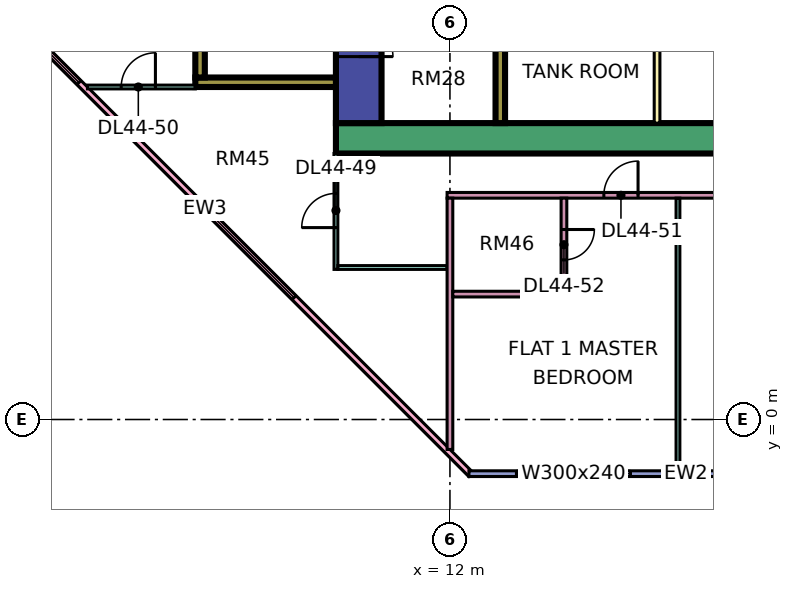
"""IFC4 building model, lengths in metres.
Left out: names, types, materials, properties, quantities, classifications, styles, units other than length and angle.
Written with IfcOpenShell. Run it as: python <this file> out.ifc"""

import sys

from ifc_helpers import new_model, si_unit, direction, frame, frame_2d, origin, place, context, subcontext, project, spatial, rectangle, extrude, element, fill, save


model = new_model("IFC4")
c1 = context("Model", 3, precision=1e-05, world=origin(), true_north=direction((0.0, 1.0)))
c2 = subcontext(c1, "Body", "Model", "MODEL_VIEW")
j1 = project(units=[si_unit("LENGTHUNIT", "METRE"), si_unit("PLANEANGLEUNIT", "RADIAN")], contexts=[c1])
p1 = place(None, origin())
s1 = spatial("IfcSite", under=j1, at=p1, CompositionType="ELEMENT")
p2 = place(p1, origin())
s2 = spatial("IfcBuilding", under=s1, at=p2, CompositionType="ELEMENT")
p3 = place(p2, frame((0.0, 0.0, 191.15)))
s3 = spatial("IfcBuildingStorey", under=s2, at=p3, CompositionType="ELEMENT", Elevation=191.15)
p4 = place(p3, frame((9.0, 7.4, 0.0), z_axis=(0.0, 0.0, 1.0), x_axis=(1.0, 0.0, 0.0)))
e1 = element("IfcWall", 1, at=p4, inside=s3, PredefinedType="SHEAR", context=c2, shape_type="SweptSolid", body=[
    extrude(rectangle(XDim=25.0, YDim=0.8, at=frame_2d((12.5, 0.0))), origin(), (0.0, 0.0, 1.0), 3.75),
])
p5 = place(p3, frame((9.6, 7.8, 0.0), z_axis=(0.0, 0.0, 1.0), x_axis=(0.0, 1.0, 0.0)))
e2 = element("IfcWall", 2, at=p5, inside=s3, PredefinedType="SHEAR", context=c2, shape_type="SweptSolid", body=[
    extrude(rectangle(XDim=11.4, YDim=1.2, at=frame_2d((5.7, 0.0))), origin(), (0.0, 0.0, 1.0), 3.75),
])
p6 = place(p5, frame((4.075, 0.0, 0.0)))
e3 = element("IfcOpeningElement", 3, at=p6, cuts=e2, PredefinedType="OPENING", context=c2, shape_type="SweptSolid", body=[
    extrude(rectangle(XDim=1.1, YDim=2.2, at=frame_2d((0.55, 1.1))), frame((0.0, 0.61, 0.0), z_axis=(0.0, -1.0, 0.0), x_axis=(1.0, 0.0, 0.0)), (0.0, 0.0, 1.0), 1.22),
])
p7 = place(p5, frame((6.575, 0.0, 0.0)))
e4 = element("IfcOpeningElement", 4, at=p7, cuts=e2, PredefinedType="OPENING", context=c2, shape_type="SweptSolid", body=[
    extrude(rectangle(XDim=1.1, YDim=2.2, at=frame_2d((0.55, 1.1))), frame((0.0, 0.61, 0.0), z_axis=(0.0, -1.0, 0.0), x_axis=(1.0, 0.0, 0.0)), (0.0, 0.0, 1.0), 1.22),
])
p8 = place(p5, frame((9.4, 0.0, 0.0)))
e5 = element("IfcOpeningElement", 5, at=p8, cuts=e2, PredefinedType="OPENING", context=c2, shape_type="SweptSolid", body=[
    extrude(rectangle(XDim=1.1, YDim=2.2, at=frame_2d((0.55, 1.1))), frame((0.0, 0.61, 0.0), z_axis=(0.0, -1.0, 0.0), x_axis=(1.0, 0.0, 0.0)), (0.0, 0.0, 1.0), 1.22),
])
p9 = place(p5, frame((1.75, 0.0, 0.0)))
e6 = element("IfcOpeningElement", 6, at=p9, cuts=e2, PredefinedType="OPENING", context=c2, shape_type="SweptSolid", body=[
    extrude(rectangle(XDim=0.9, YDim=2.1, at=frame_2d((0.45, 1.05))), frame((0.0, 0.61, 0.0), z_axis=(0.0, -1.0, 0.0), x_axis=(1.0, 0.0, 0.0)), (0.0, 0.0, 1.0), 1.22),
])
p10 = place(p3, frame((13.325, 7.8, 0.0), z_axis=(0.0, 0.0, 1.0), x_axis=(0.0, 1.0, 0.0)))
e7 = element("IfcWall", 7, at=p10, inside=s3, PredefinedType="SHEAR", context=c2, shape_type="SweptSolid", body=[
    extrude(rectangle(XDim=11.4, YDim=0.25, at=frame_2d((5.7, 0.0))), origin(), (0.0, 0.0, 1.0), 3.75),
])
p11 = place(p3, frame((5.3, 8.875, 0.0), z_axis=(0.0, 0.0, 1.0), x_axis=(1.0, 0.0, 0.0)))
e8 = element("IfcWall", 8, at=p11, inside=s3, PredefinedType="SHEAR", context=c2, shape_type="SweptSolid", body=[
    extrude(rectangle(XDim=3.7, YDim=0.25, at=frame_2d((1.85, 0.0))), origin(), (0.0, 0.0, 1.0), 3.75),
])
p12 = place(p3, frame((5.425, 9.0, 0.0), z_axis=(0.0, 0.0, 1.0), x_axis=(0.0, 1.0, 0.0)))
e9 = element("IfcWall", 9, at=p12, inside=s3, PredefinedType="SHEAR", context=c2, shape_type="SweptSolid", body=[
    extrude(rectangle(XDim=4.0, YDim=0.25, at=frame_2d((2.0, 0.0))), origin(), (0.0, 0.0, 1.0), 3.75),
])
p13 = place(p3, frame((-1.447, 12.553, 0.0), z_axis=(0.0, 0.0, 1.0), x_axis=(0.707106781187, -0.707106781187, 0.0)))
e10 = element("IfcWall", 10, at=p13, inside=s3, PredefinedType="SOLIDWALL", context=c2, shape_type="SweptSolid", body=[
    extrude(rectangle(XDim=19.799, YDim=0.15, at=frame_2d((9.899, 0.0))), origin(), (0.0, 0.0, 1.0), 3.35),
])
p14 = place(p13, frame((2.212, 0.0, 0.45)))
e11 = element("IfcOpeningElement", 11, at=p14, cuts=e10, PredefinedType="OPENING", context=c2, shape_type="SweptSolid", body=[
    extrude(rectangle(XDim=3.0, YDim=2.4, at=frame_2d((1.5, 1.2))), frame((0.0, 0.085, 0.0), z_axis=(0.0, -1.0, 0.0), x_axis=(1.0, 0.0, 0.0)), (0.0, 0.0, 1.0), 0.17),
])
p15 = place(p13, frame((10.216, 0.0, 0.45)))
e12 = element("IfcOpeningElement", 12, at=p15, cuts=e10, PredefinedType="OPENING", context=c2, shape_type="SweptSolid", body=[
    extrude(rectangle(XDim=3.0, YDim=2.4, at=frame_2d((1.5, 1.2))), frame((0.0, 0.085, 0.0), z_axis=(0.0, -1.0, 0.0), x_axis=(1.0, 0.0, 0.0)), (0.0, 0.0, 1.0), 0.17),
])
p16 = place(p3, frame((12.5, -1.425, 0.0), z_axis=(0.0, 0.0, 1.0), x_axis=(1.0, 0.0, 0.0)))
e13 = element("IfcWall", 13, at=p16, inside=s3, PredefinedType="SOLIDWALL", context=c2, shape_type="SweptSolid", body=[
    extrude(rectangle(XDim=11.425, YDim=0.15, at=frame_2d((5.712, 0.0))), origin(), (0.0, 0.0, 1.0), 3.35),
])
p17 = place(p16, frame((1.25, 0.0, 0.45)))
e14 = element("IfcOpeningElement", 14, at=p17, cuts=e13, PredefinedType="OPENING", context=c2, shape_type="SweptSolid", body=[
    extrude(rectangle(XDim=3.0, YDim=2.4, at=frame_2d((1.5, 1.2))), frame((0.0, 0.085, 0.0), z_axis=(0.0, -1.0, 0.0), x_axis=(1.0, 0.0, 0.0)), (0.0, 0.0, 1.0), 0.17),
])
p18 = place(p16, frame((6.962, 0.0, 0.45)))
e15 = element("IfcOpeningElement", 15, at=p18, cuts=e13, PredefinedType="OPENING", context=c2, shape_type="SweptSolid", body=[
    extrude(rectangle(XDim=3.0, YDim=2.4, at=frame_2d((1.5, 1.2))), frame((0.0, 0.085, 0.0), z_axis=(0.0, -1.0, 0.0), x_axis=(1.0, 0.0, 0.0)), (0.0, 0.0, 1.0), 0.17),
])
p19 = place(p3, frame((17.45, 7.8, 0.0), z_axis=(0.0, 0.0, 1.0), x_axis=(0.0, 1.0, 0.0)))
e16 = element("IfcWall", 16, at=p19, inside=s3, PredefinedType="PARTITIONING", context=c2, shape_type="SweptSolid", body=[
    extrude(rectangle(XDim=3.4, YDim=0.15, at=frame_2d((1.7, 0.0))), origin(), (0.0, 0.0, 1.0), 3.35),
])
p20 = place(p3, frame((2.461, 8.75, 0.0), z_axis=(0.0, 0.0, 1.0), x_axis=(1.0, 0.0, 0.0)))
e17 = element("IfcWall", 17, at=p20, inside=s3, PredefinedType="PARTITIONING", context=c2, shape_type="SweptSolid", body=[
    extrude(rectangle(XDim=2.839, YDim=0.1, at=frame_2d((1.419, 0.0))), origin(), (0.0, 0.0, 1.0), 3.35),
])
p21 = place(p20, frame((0.889, 0.0, 0.0)))
e18 = element("IfcOpeningElement", 18, at=p21, cuts=e17, PredefinedType="OPENING", context=c2, shape_type="SweptSolid", body=[
    extrude(rectangle(XDim=0.9, YDim=2.1, at=frame_2d((0.45, 1.05))), frame((0.0, 0.06, 0.0), z_axis=(0.0, -1.0, 0.0), x_axis=(1.0, 0.0, 0.0)), (0.0, 0.0, 1.0), 0.12),
])
p22 = place(p3, frame((9.0, 3.95, 0.0), z_axis=(0.0, 0.0, 1.0), x_axis=(0.0, 1.0, 0.0)))
e19 = element("IfcWall", 19, at=p22, inside=s3, PredefinedType="PARTITIONING", context=c2, shape_type="SweptSolid", body=[
    extrude(rectangle(XDim=3.05, YDim=0.1, at=frame_2d((1.525, 0.0))), origin(), (0.0, 0.0, 1.0), 3.35),
])
p23 = place(p22, frame((1.1, 0.0, 0.0)))
e20 = element("IfcOpeningElement", 20, at=p23, cuts=e19, PredefinedType="OPENING", context=c2, shape_type="SweptSolid", body=[
    extrude(rectangle(XDim=0.9, YDim=2.1, at=frame_2d((0.45, 1.05))), frame((0.0, 0.06, 0.0), z_axis=(0.0, -1.0, 0.0), x_axis=(1.0, 0.0, 0.0)), (0.0, 0.0, 1.0), 0.12),
])
p24 = place(p3, frame((9.05, 4.0, 0.0), z_axis=(0.0, 0.0, 1.0), x_axis=(1.0, 0.0, 0.0)))
e21 = element("IfcWall", 21, at=p24, inside=s3, PredefinedType="PARTITIONING", context=c2, shape_type="SweptSolid", body=[
    extrude(rectangle(XDim=2.875, YDim=0.1, at=frame_2d((1.438, 0.0))), origin(), (0.0, 0.0, 1.0), 3.35),
])
p25 = place(p3, frame((11.925, 5.9, 0.0), z_axis=(0.0, 0.0, 1.0), x_axis=(1.0, 0.0, 0.0)))
e22 = element("IfcWall", 22, at=p25, inside=s3, PredefinedType="PARTITIONING", context=c2, shape_type="SweptSolid", body=[
    extrude(rectangle(XDim=21.125, YDim=0.15, at=frame_2d((10.562, 0.0))), origin(), (0.0, 0.0, 1.0), 3.35),
])
p26 = place(p25, frame((16.125, 0.0, 0.0)))
e23 = element("IfcOpeningElement", 23, at=p26, cuts=e22, PredefinedType="OPENING", context=c2, shape_type="SweptSolid", body=[
    extrude(rectangle(XDim=0.9, YDim=2.1, at=frame_2d((0.45, 1.05))), frame((0.0, 0.085, 0.0), z_axis=(0.0, -1.0, 0.0), x_axis=(1.0, 0.0, 0.0)), (0.0, 0.0, 1.0), 0.17),
])
p27 = place(p25, frame((4.125, 0.0, 0.0)))
e24 = element("IfcOpeningElement", 24, at=p27, cuts=e22, PredefinedType="OPENING", context=c2, shape_type="SweptSolid", body=[
    extrude(rectangle(XDim=0.9, YDim=2.1, at=frame_2d((0.45, 1.05))), frame((0.0, 0.085, 0.0), z_axis=(0.0, -1.0, 0.0), x_axis=(1.0, 0.0, 0.0)), (0.0, 0.0, 1.0), 0.17),
])
p28 = place(p25, frame((10.125, 0.0, 0.0)))
e25 = element("IfcOpeningElement", 25, at=p28, cuts=e22, PredefinedType="OPENING", context=c2, shape_type="SweptSolid", body=[
    extrude(rectangle(XDim=0.9, YDim=2.1, at=frame_2d((0.45, 1.05))), frame((0.0, 0.085, 0.0), z_axis=(0.0, -1.0, 0.0), x_axis=(1.0, 0.0, 0.0)), (0.0, 0.0, 1.0), 0.17),
])
p29 = place(p3, frame((12.0, -0.788, 0.0), z_axis=(0.0, 0.0, 1.0), x_axis=(0.0, 1.0, 0.0)))
e26 = element("IfcWall", 26, at=p29, inside=s3, PredefinedType="PARTITIONING", context=c2, shape_type="SweptSolid", body=[
    extrude(rectangle(XDim=6.613, YDim=0.15, at=frame_2d((3.306, 0.0))), origin(), (0.0, 0.0, 1.0), 3.35),
])
p30 = place(p3, frame((12.075, 3.3, 0.0), z_axis=(0.0, 0.0, 1.0), x_axis=(1.0, 0.0, 0.0)))
e27 = element("IfcWall", 27, at=p30, inside=s3, PredefinedType="PARTITIONING", context=c2, shape_type="SweptSolid", body=[
    extrude(rectangle(XDim=3.0, YDim=0.15, at=frame_2d((1.5, 0.0))), origin(), (0.0, 0.0, 1.0), 3.35),
])
p31 = place(p3, frame((15.0, 3.375, 0.0), z_axis=(0.0, 0.0, 1.0), x_axis=(0.0, 1.0, 0.0)))
e28 = element("IfcWall", 28, at=p31, inside=s3, PredefinedType="PARTITIONING", context=c2, shape_type="SweptSolid", body=[
    extrude(rectangle(XDim=2.45, YDim=0.15, at=frame_2d((1.225, 0.0))), origin(), (0.0, 0.0, 1.0), 3.35),
])
p32 = place(p31, frame((0.825, 0.0, 0.0)))
e29 = element("IfcOpeningElement", 29, at=p32, cuts=e28, PredefinedType="OPENING", context=c2, shape_type="SweptSolid", body=[
    extrude(rectangle(XDim=0.8, YDim=2.1, at=frame_2d((0.4, 1.05))), frame((0.0, 0.085, 0.0), z_axis=(0.0, -1.0, 0.0), x_axis=(1.0, 0.0, 0.0)), (0.0, 0.0, 1.0), 0.17),
])
p33 = place(p3, frame((18.0, -1.35, 0.0), z_axis=(0.0, 0.0, 1.0), x_axis=(0.0, 1.0, 0.0)))
e30 = element("IfcWall", 30, at=p33, inside=s3, PredefinedType="PARTITIONING", context=c2, shape_type="SweptSolid", body=[
    extrude(rectangle(XDim=7.175, YDim=0.1, at=frame_2d((3.587, 0.0))), origin(), (0.0, 0.0, 1.0), 3.35),
])
p34 = place(p14, origin())
e31 = element("IfcWindow", 31, at=p34, inside=s3, PartitioningType="SINGLE_PANEL", PredefinedType="WINDOW", context=c2, shape_type="SweptSolid", body=[
    extrude(rectangle(XDim=3.0, YDim=2.4, at=frame_2d((1.5, 1.2))), frame((0.0, 0.03, 0.0), z_axis=(0.0, -1.0, 0.0), x_axis=(1.0, 0.0, 0.0)), (0.0, 0.0, 1.0), 0.06),
])
fill(e11, e31)
p35 = place(p15, origin())
e32 = element("IfcWindow", 32, at=p35, inside=s3, PartitioningType="SINGLE_PANEL", PredefinedType="WINDOW", context=c2, shape_type="SweptSolid", body=[
    extrude(rectangle(XDim=3.0, YDim=2.4, at=frame_2d((1.5, 1.2))), frame((0.0, 0.03, 0.0), z_axis=(0.0, -1.0, 0.0), x_axis=(1.0, 0.0, 0.0)), (0.0, 0.0, 1.0), 0.06),
])
fill(e12, e32)
p36 = place(p17, origin())
e33 = element("IfcWindow", 33, at=p36, inside=s3, PartitioningType="SINGLE_PANEL", PredefinedType="WINDOW", context=c2, shape_type="SweptSolid", body=[
    extrude(rectangle(XDim=3.0, YDim=2.4, at=frame_2d((1.5, 1.2))), frame((0.0, 0.03, 0.0), z_axis=(0.0, -1.0, 0.0), x_axis=(1.0, 0.0, 0.0)), (0.0, 0.0, 1.0), 0.06),
])
fill(e14, e33)
p37 = place(p9, frame((0.9, 0.0, 0.0), z_axis=(0.0, 0.0, 1.0), x_axis=(-1.0, 0.0, 0.0)))
e34 = element("IfcDoor", 34, at=p37, inside=s3, OperationType="SINGLE_SWING_LEFT", PredefinedType="DOOR", context=c2, shape_type="SweptSolid", body=[
    extrude(rectangle(XDim=0.9, YDim=2.1, at=frame_2d((0.45, 1.05))), frame((0.0, 0.025, 0.0), z_axis=(0.0, -1.0, 0.0), x_axis=(1.0, 0.0, 0.0)), (0.0, 0.0, 1.0), 0.05),
])
fill(e6, e34)
p38 = place(p23, origin())
e35 = element("IfcDoor", 35, at=p38, inside=s3, OperationType="SINGLE_SWING_LEFT", PredefinedType="DOOR", context=c2, shape_type="SweptSolid", body=[
    extrude(rectangle(XDim=0.9, YDim=2.1, at=frame_2d((0.45, 1.05))), frame((0.0, 0.025, 0.0), z_axis=(0.0, -1.0, 0.0), x_axis=(1.0, 0.0, 0.0)), (0.0, 0.0, 1.0), 0.05),
])
fill(e20, e35)
p39 = place(p21, frame((0.9, 0.0, 0.0), z_axis=(0.0, 0.0, 1.0), x_axis=(-1.0, 0.0, 0.0)))
e36 = element("IfcDoor", 36, at=p39, inside=s3, OperationType="SINGLE_SWING_RIGHT", PredefinedType="DOOR", context=c2, shape_type="SweptSolid", body=[
    extrude(rectangle(XDim=0.9, YDim=2.1, at=frame_2d((0.45, 1.05))), frame((0.0, 0.025, 0.0), z_axis=(0.0, -1.0, 0.0), x_axis=(1.0, 0.0, 0.0)), (0.0, 0.0, 1.0), 0.05),
])
fill(e18, e36)
p40 = place(p27, frame((0.9, 0.0, 0.0), z_axis=(0.0, 0.0, 1.0), x_axis=(-1.0, 0.0, 0.0)))
e37 = element("IfcDoor", 37, at=p40, inside=s3, OperationType="SINGLE_SWING_RIGHT", PredefinedType="DOOR", context=c2, shape_type="SweptSolid", body=[
    extrude(rectangle(XDim=0.9, YDim=2.1, at=frame_2d((0.45, 1.05))), frame((0.0, 0.025, 0.0), z_axis=(0.0, -1.0, 0.0), x_axis=(1.0, 0.0, 0.0)), (0.0, 0.0, 1.0), 0.05),
])
fill(e24, e37)
p41 = place(p32, origin())
e38 = element("IfcDoor", 38, at=p41, inside=s3, OperationType="SINGLE_SWING_RIGHT", PredefinedType="DOOR", context=c2, shape_type="SweptSolid", body=[
    extrude(rectangle(XDim=0.8, YDim=2.1, at=frame_2d((0.4, 1.05))), frame((0.0, 0.025, 0.0), z_axis=(0.0, -1.0, 0.0), x_axis=(1.0, 0.0, 0.0)), (0.0, 0.0, 1.0), 0.05),
])
fill(e29, e38)
save(model, sys.argv[1])
